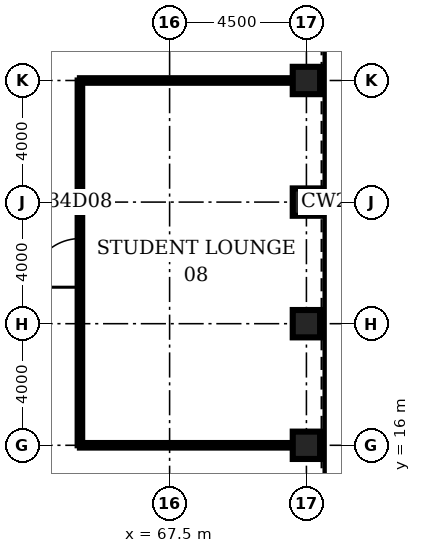
"""IFC4 building model, lengths in metres.
Left out: names, types, materials, properties, quantities, classifications, styles, units other than length and angle.
Written with IfcOpenShell. Run it as: python <this file> out.ifc"""

import sys

from ifc_helpers import new_model, si_unit, direction, frame, frame_2d, origin, origin_2d, place, context, subcontext, project, spatial, rectangle, hollow_rectangle, extrude, element, fill, save


model = new_model("IFC4")
c1 = context("Model", 3, precision=1e-05, world=origin(), true_north=direction((0.0, 1.0)))
c2 = subcontext(c1, "Body", "Model", "MODEL_VIEW")
j1 = project(units=[si_unit("LENGTHUNIT", "METRE"), si_unit("PLANEANGLEUNIT", "RADIAN")], contexts=[c1])
p1 = place(None, origin())
s1 = spatial("IfcSite", under=j1, at=p1, CompositionType="ELEMENT")
p2 = place(p1, origin())
s2 = spatial("IfcBuilding", under=s1, at=p2, CompositionType="ELEMENT")
p3 = place(p2, frame((0.0, 0.0, 155.1)))
s3 = spatial("IfcBuildingStorey", under=s2, at=p3, CompositionType="ELEMENT", Elevation=155.1)
for number, where, z_axis, x_axis in (
    (1, (72.0, 16.0, 0.0), (0.0, 0.0, 1.0), (1.0, 0.0, 0.0)),
    (2, (72.0, 20.0, 0.0), (0.0, 0.0, 1.0), (1.0, 0.0, 0.0)),
    (3, (72.0, 24.0, 0.0), (0.0, 0.0, 1.0), (1.0, 0.0, 0.0)),
    (4, (72.0, 28.0, 0.0), (0.0, 0.0, 1.0), (1.0, 0.0, 0.0)),
):
    element("IfcColumn", number, at=place(p3, frame(where, z_axis=z_axis, x_axis=x_axis)), inside=s3, PredefinedType="COLUMN", context=c2, shape_type="SweptSolid", body=[
        extrude(hollow_rectangle(XDim=0.9, YDim=0.9, WallThickness=0.1, at=origin_2d()), origin(), (0.0, 0.0, 1.0), 4.2),
    ])
for number, where, z_axis, x_axis in (
    (5, (64.55, 16.0, 0.0), (0.0, 0.0, 1.0), (1.0, 0.0, 0.0)),
    (6, (64.55, 28.0, 0.0), (0.0, 0.0, 1.0), (1.0, 0.0, 0.0)),
):
    element("IfcWall", number, at=place(p3, frame(where, z_axis=z_axis, x_axis=x_axis)), inside=s3, PredefinedType="PARTITIONING", context=c2, shape_type="SweptSolid", body=[
        extrude(rectangle(XDim=7.0, YDim=0.15, at=frame_2d((3.5, 0.0))), origin(), (0.0, 0.0, 1.0), 3.0),
    ])
p4 = place(p3, frame((64.55, 16.0, 0.0), z_axis=(0.0, 0.0, 1.0), x_axis=(0.0, 1.0, 0.0)))
e7 = element("IfcWall", 7, at=p4, inside=s3, PredefinedType="PARTITIONING", context=c2, shape_type="SweptSolid", body=[
    extrude(rectangle(XDim=12.0, YDim=0.15, at=frame_2d((6.0, 0.0))), origin(), (0.0, 0.0, 1.0), 3.0),
])
p5 = place(p4, frame((5.2, 0.0, 0.0)))
e8 = element("IfcOpeningElement", 8, at=p5, cuts=e7, PredefinedType="OPENING", context=c2, shape_type="SweptSolid", body=[
    extrude(rectangle(XDim=1.6, YDim=2.1, at=frame_2d((0.8, 1.05))), frame((0.0, 0.085, 0.0), z_axis=(0.0, -1.0, 0.0), x_axis=(1.0, 0.0, 0.0)), (0.0, 0.0, 1.0), 0.17),
])
p6 = place(p5, origin())
e9 = element("IfcDoor", 9, at=p6, inside=s3, OperationType="SINGLE_SWING_LEFT", PredefinedType="DOOR", context=c2, shape_type="SweptSolid", body=[
    extrude(rectangle(XDim=1.6, YDim=2.1, at=frame_2d((0.8, 1.05))), frame((0.0, 0.025, 0.0), z_axis=(0.0, -1.0, 0.0), x_axis=(1.0, 0.0, 0.0)), (0.0, 0.0, 1.0), 0.05),
])
fill(e8, e9)
save(model, sys.argv[1])
